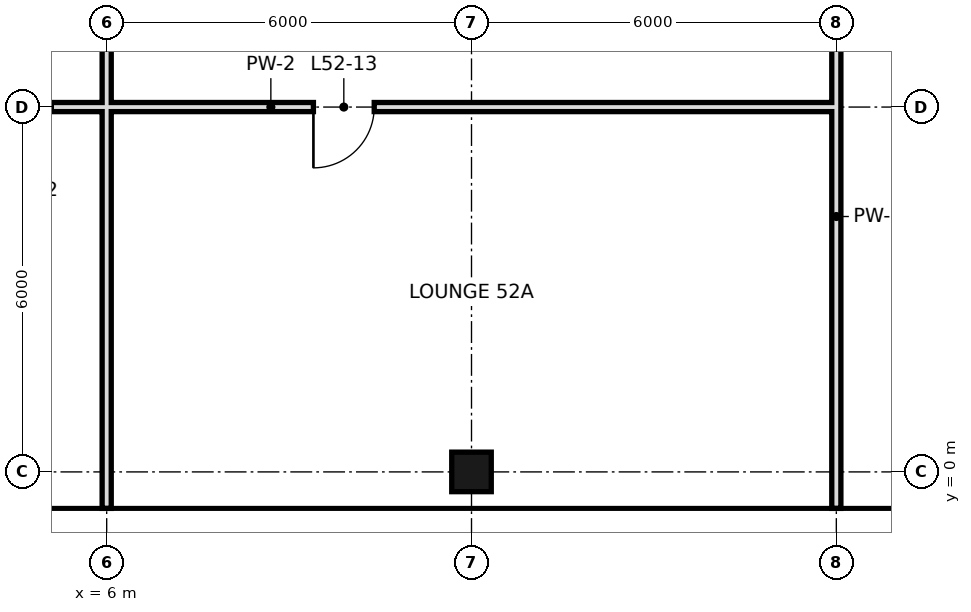
"""IFC4 building model, lengths in metres.
Left out: names, types, materials, properties, quantities, classifications, styles, units other than length and angle.
Written with IfcOpenShell. Run it as: python <this file> out.ifc"""

import sys

from ifc_helpers import new_model, si_unit, direction, frame, frame_2d, origin, origin_2d, place, context, subcontext, project, spatial, rectangle, hollow_rectangle, extrude, element, fill, save


model = new_model("IFC4")
c1 = context("Model", 3, precision=1e-05, world=origin(), true_north=direction((0.0, 1.0)))
c2 = subcontext(c1, "Body", "Model", "MODEL_VIEW")
j1 = project(units=[si_unit("LENGTHUNIT", "METRE"), si_unit("PLANEANGLEUNIT", "RADIAN")], contexts=[c1])
p1 = place(None, origin())
s1 = spatial("IfcSite", under=j1, at=p1, CompositionType="ELEMENT")
p2 = place(p1, origin())
s2 = spatial("IfcBuilding", under=s1, at=p2, CompositionType="ELEMENT")
p3 = place(p2, frame((0.0, 0.0, 222.6)))
s3 = spatial("IfcBuildingStorey", under=s2, at=p3, CompositionType="ELEMENT", Elevation=222.6)
p4 = place(p3, frame((12.0, 0.0, 0.0), z_axis=(0.0, 0.0, 1.0), x_axis=(1.0, 0.0, 0.0)))
e1 = element("IfcColumn", 1, at=p4, inside=s3, PredefinedType="COLUMN", context=c2, shape_type="SweptSolid", body=[
    extrude(hollow_rectangle(XDim=0.65, YDim=0.65, WallThickness=0.032, at=origin_2d()), origin(), (0.0, 0.0, 1.0), 3.6),
])
p5 = place(p3, frame((18.0, -0.6, 0.0), z_axis=(0.0, 0.0, 1.0), x_axis=(0.0, 1.0, 0.0)))
e2 = element("IfcWall", 2, at=p5, inside=s3, PredefinedType="PARTITIONING", context=c2, shape_type="SweptSolid", body=[
    extrude(rectangle(XDim=9.6, YDim=0.15, at=frame_2d((4.8, 0.0))), origin(), (0.0, 0.0, 1.0), 2.72),
])
p6 = place(p3, frame((6.0, -0.6, 0.0), z_axis=(0.0, 0.0, 1.0), x_axis=(0.0, 1.0, 0.0)))
e3 = element("IfcWall", 3, at=p6, inside=s3, PredefinedType="PARTITIONING", context=c2, shape_type="SweptSolid", body=[
    extrude(rectangle(XDim=6.6, YDim=0.15, at=frame_2d((3.3, 0.0))), origin(), (0.0, 0.0, 1.0), 2.72),
])
p7 = place(p3, frame((6.0, 6.0, 0.0), z_axis=(0.0, 0.0, 1.0), x_axis=(0.0, 1.0, 0.0)))
e4 = element("IfcWall", 4, at=p7, inside=s3, PredefinedType="PARTITIONING", context=c2, shape_type="SweptSolid", body=[
    extrude(rectangle(XDim=3.0, YDim=0.15, at=frame_2d((1.5, 0.0))), origin(), (0.0, 0.0, 1.0), 2.72),
])
p8 = place(p3, frame((6.0, 6.0, 0.0), z_axis=(0.0, 0.0, 1.0), x_axis=(1.0, 0.0, 0.0)))
e5 = element("IfcWall", 5, at=p8, inside=s3, PredefinedType="PARTITIONING", context=c2, shape_type="SweptSolid", body=[
    extrude(rectangle(XDim=12.0, YDim=0.15, at=frame_2d((6.0, 0.0))), origin(), (0.0, 0.0, 1.0), 2.97),
])
p9 = place(p8, frame((3.4, 0.0, 0.0)))
e6 = element("IfcOpeningElement", 6, at=p9, cuts=e5, PredefinedType="OPENING", context=c2, shape_type="SweptSolid", body=[
    extrude(rectangle(XDim=1.0, YDim=2.4, at=frame_2d((0.5, 1.2))), frame((0.0, 0.085, 0.0), z_axis=(0.0, -1.0, 0.0), x_axis=(1.0, 0.0, 0.0)), (0.0, 0.0, 1.0), 0.17),
])
p10 = place(p3, frame((2.4, 6.0, 0.0), z_axis=(0.0, 0.0, 1.0), x_axis=(1.0, 0.0, 0.0)))
e7 = element("IfcWall", 7, at=p10, inside=s3, PredefinedType="PARTITIONING", context=c2, shape_type="SweptSolid", body=[
    extrude(rectangle(XDim=3.6, YDim=0.15, at=frame_2d((1.8, 0.0))), origin(), (0.0, 0.0, 1.0), 2.97),
])
p11 = place(p10, frame((1.79, 0.0, 0.0)))
e8 = element("IfcOpeningElement", 8, at=p11, cuts=e7, PredefinedType="OPENING", context=c2, shape_type="SweptSolid", body=[
    extrude(rectangle(XDim=0.9, YDim=2.4, at=frame_2d((0.45, 1.2))), frame((0.0, 0.085, 0.0), z_axis=(0.0, -1.0, 0.0), x_axis=(1.0, 0.0, 0.0)), (0.0, 0.0, 1.0), 0.17),
])
p12 = place(p9, frame((1.0, 0.0, 0.0), z_axis=(0.0, 0.0, 1.0), x_axis=(-1.0, 0.0, 0.0)))
e9 = element("IfcDoor", 9, at=p12, inside=s3, OperationType="SINGLE_SWING_RIGHT", PredefinedType="DOOR", context=c2, shape_type="SweptSolid", body=[
    extrude(rectangle(XDim=1.0, YDim=2.4, at=frame_2d((0.5, 1.2))), frame((0.0, 0.025, 0.0), z_axis=(0.0, -1.0, 0.0), x_axis=(1.0, 0.0, 0.0)), (0.0, 0.0, 1.0), 0.05),
])
fill(e6, e9)
save(model, sys.argv[1])
